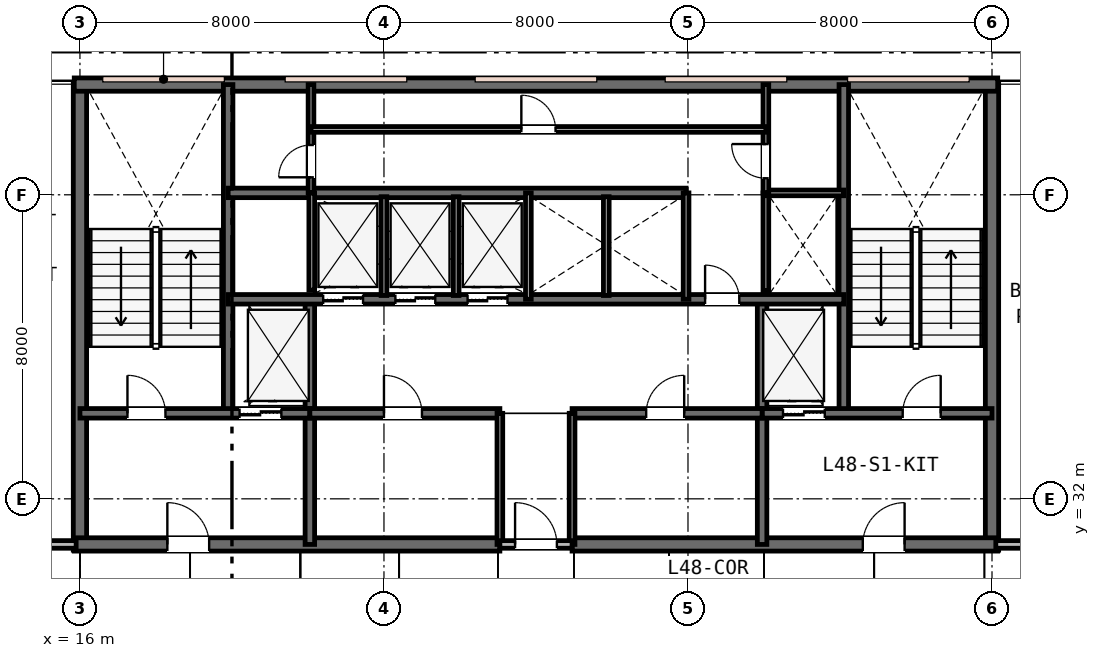
"""IFC4 building model, lengths in metres.
Left out: names, types, materials, properties, quantities, classifications, styles, units other than length and angle.
Written with IfcOpenShell. Run it as: python <this file> out.ifc"""

import sys

from ifc_helpers import new_model, si_unit, direction, frame, frame_2d, origin, place, context, subcontext, project, spatial, rectangle, extrude, element, fill, save


model = new_model("IFC4")
c1 = context("Model", 3, precision=1e-05, world=origin(), true_north=direction((0.0, 1.0)))
c2 = subcontext(c1, "Body", "Model", "MODEL_VIEW")
j1 = project(units=[si_unit("LENGTHUNIT", "METRE"), si_unit("PLANEANGLEUNIT", "RADIAN")], contexts=[c1])
p1 = place(None, origin())
s1 = spatial("IfcSite", under=j1, at=p1, CompositionType="ELEMENT")
p2 = place(p1, origin())
s2 = spatial("IfcBuilding", under=s1, at=p2, CompositionType="ELEMENT")
p3 = place(p2, frame((0.0, 0.0, 186.6)))
s3 = spatial("IfcBuildingStorey", under=s2, at=p3, CompositionType="ELEMENT", Elevation=186.6)
for number, where, z_axis, x_axis in (
    (1, (16.0, 30.65, 0.0), (0.0, 0.0, 1.0), (0.0, 1.0, 0.0)),
    (2, (40.0, 30.65, 0.0), (0.0, 0.0, 1.0), (0.0, 1.0, 0.0)),
):
    element("IfcWall", number, at=place(p3, frame(where, z_axis=z_axis, x_axis=x_axis)), inside=s3, PredefinedType="SHEAR", context=c2, shape_type="SweptSolid", body=[
        extrude(rectangle(XDim=12.3, YDim=0.35, at=frame_2d((6.15, 0.0))), origin(), (0.0, 0.0, 1.0), 3.6),
    ])
p4 = place(p3, frame((15.85, 42.9, 0.0), z_axis=(0.0, 0.0, 1.0), x_axis=(1.0, 0.0, 0.0)))
e3 = element("IfcWall", 3, at=p4, inside=s3, PredefinedType="SHEAR", context=c2, shape_type="SweptSolid", body=[
    extrude(rectangle(XDim=24.3, YDim=0.35, at=frame_2d((12.15, 0.0))), origin(), (0.0, 0.0, 1.0), 3.6),
])
p5 = place(p3, frame((15.85, 30.8, 0.0), z_axis=(0.0, 0.0, 1.0), x_axis=(1.0, 0.0, 0.0)))
e4 = element("IfcWall", 4, at=p5, inside=s3, PredefinedType="SHEAR", context=c2, shape_type="SweptSolid", body=[
    extrude(rectangle(XDim=11.2, YDim=0.35, at=frame_2d((5.6, 0.0))), origin(), (0.0, 0.0, 1.0), 3.6),
])
p6 = place(p5, frame((2.45, 0.0, 0.0)))
e5 = element("IfcOpeningElement", 5, at=p6, cuts=e4, PredefinedType="OPENING", context=c2, shape_type="SweptSolid", body=[
    extrude(rectangle(XDim=1.1, YDim=2.15, at=frame_2d((0.55, 1.075))), frame((0.0, 0.185, 0.0), z_axis=(0.0, -1.0, 0.0), x_axis=(1.0, 0.0, 0.0)), (0.0, 0.0, 1.0), 0.37),
])
p7 = place(p3, frame((28.95, 30.8, 0.0), z_axis=(0.0, 0.0, 1.0), x_axis=(1.0, 0.0, 0.0)))
e6 = element("IfcWall", 6, at=p7, inside=s3, PredefinedType="SHEAR", context=c2, shape_type="SweptSolid", body=[
    extrude(rectangle(XDim=11.2, YDim=0.35, at=frame_2d((5.6, 0.0))), origin(), (0.0, 0.0, 1.0), 3.6),
])
p8 = place(p7, frame((7.65, 0.0, 0.0)))
e7 = element("IfcOpeningElement", 7, at=p8, cuts=e6, PredefinedType="OPENING", context=c2, shape_type="SweptSolid", body=[
    extrude(rectangle(XDim=1.1, YDim=2.15, at=frame_2d((0.55, 1.075))), frame((0.0, 0.185, 0.0), z_axis=(0.0, -1.0, 0.0), x_axis=(1.0, 0.0, 0.0)), (0.0, 0.0, 1.0), 0.37),
])
for number, where, z_axis, x_axis in (
    (8, (19.9, 34.25, 0.0), (0.0, 0.0, 1.0), (0.0, 1.0, 0.0)),
    (9, (36.1, 34.25, 0.0), (0.0, 0.0, 1.0), (0.0, 1.0, 0.0)),
):
    element("IfcWall", number, at=place(p3, frame(where, z_axis=z_axis, x_axis=x_axis)), inside=s3, PredefinedType="SHEAR", context=c2, shape_type="SweptSolid", body=[
        extrude(rectangle(XDim=8.65, YDim=0.25, at=frame_2d((4.325, 0.0))), origin(), (0.0, 0.0, 1.0), 3.6),
    ])
for number, where, z_axis, x_axis in (
    (10, (22.05, 30.8, 0.0), (0.0, 0.0, 1.0), (0.0, 1.0, 0.0)),
    (11, (33.95, 30.8, 0.0), (0.0, 0.0, 1.0), (0.0, 1.0, 0.0)),
):
    element("IfcWall", number, at=place(p3, frame(where, z_axis=z_axis, x_axis=x_axis)), inside=s3, PredefinedType="SHEAR", context=c2, shape_type="SweptSolid", body=[
        extrude(rectangle(XDim=6.45, YDim=0.25, at=frame_2d((3.225, 0.0))), origin(), (0.0, 0.0, 1.0), 3.6),
    ])
p9 = place(p3, frame((16.0, 34.25, 0.0), z_axis=(0.0, 0.0, 1.0), x_axis=(1.0, 0.0, 0.0)))
e12 = element("IfcWall", 12, at=p9, inside=s3, PredefinedType="SHEAR", context=c2, shape_type="SweptSolid", body=[
    extrude(rectangle(XDim=6.05, YDim=0.25, at=frame_2d((3.025, 0.0))), origin(), (0.0, 0.0, 1.0), 3.6),
])
p10 = place(p9, frame((1.25, 0.0, 0.0)))
e13 = element("IfcOpeningElement", 13, at=p10, cuts=e12, PredefinedType="OPENING", context=c2, shape_type="SweptSolid", body=[
    extrude(rectangle(XDim=1.0, YDim=2.15, at=frame_2d((0.5, 1.075))), frame((0.0, 0.135, 0.0), z_axis=(0.0, -1.0, 0.0), x_axis=(1.0, 0.0, 0.0)), (0.0, 0.0, 1.0), 0.27),
])
p11 = place(p9, frame((4.2, 0.0, 0.0)))
e14 = element("IfcOpeningElement", 14, at=p11, cuts=e12, PredefinedType="OPENING", context=c2, shape_type="SweptSolid", body=[
    extrude(rectangle(XDim=1.1, YDim=2.15, at=frame_2d((0.55, 1.075))), frame((0.0, 0.135, 0.0), z_axis=(0.0, -1.0, 0.0), x_axis=(1.0, 0.0, 0.0)), (0.0, 0.0, 1.0), 0.27),
])
p12 = place(p3, frame((33.95, 34.25, 0.0), z_axis=(0.0, 0.0, 1.0), x_axis=(1.0, 0.0, 0.0)))
e15 = element("IfcWall", 15, at=p12, inside=s3, PredefinedType="SHEAR", context=c2, shape_type="SweptSolid", body=[
    extrude(rectangle(XDim=6.05, YDim=0.25, at=frame_2d((3.025, 0.0))), origin(), (0.0, 0.0, 1.0), 3.6),
])
p13 = place(p12, frame((3.7, 0.0, 0.0)))
e16 = element("IfcOpeningElement", 16, at=p13, cuts=e15, PredefinedType="OPENING", context=c2, shape_type="SweptSolid", body=[
    extrude(rectangle(XDim=1.0, YDim=2.15, at=frame_2d((0.5, 1.075))), frame((0.0, 0.135, 0.0), z_axis=(0.0, -1.0, 0.0), x_axis=(1.0, 0.0, 0.0)), (0.0, 0.0, 1.0), 0.27),
])
p14 = place(p12, frame((0.55, 0.0, 0.0)))
e17 = element("IfcOpeningElement", 17, at=p14, cuts=e15, PredefinedType="OPENING", context=c2, shape_type="SweptSolid", body=[
    extrude(rectangle(XDim=1.1, YDim=2.15, at=frame_2d((0.55, 1.075))), frame((0.0, 0.135, 0.0), z_axis=(0.0, -1.0, 0.0), x_axis=(1.0, 0.0, 0.0)), (0.0, 0.0, 1.0), 0.27),
])
p15 = place(p3, frame((22.05, 34.25, 0.0), z_axis=(0.0, 0.0, 1.0), x_axis=(1.0, 0.0, 0.0)))
e18 = element("IfcWall", 18, at=p15, inside=s3, PredefinedType="SHEAR", context=c2, shape_type="SweptSolid", body=[
    extrude(rectangle(XDim=5.0, YDim=0.25, at=frame_2d((2.5, 0.0))), origin(), (0.0, 0.0, 1.0), 3.6),
])
p16 = place(p15, frame((1.95, 0.0, 0.0)))
e19 = element("IfcOpeningElement", 19, at=p16, cuts=e18, PredefinedType="OPENING", context=c2, shape_type="SweptSolid", body=[
    extrude(rectangle(XDim=1.0, YDim=2.15, at=frame_2d((0.5, 1.075))), frame((0.0, 0.135, 0.0), z_axis=(0.0, -1.0, 0.0), x_axis=(1.0, 0.0, 0.0)), (0.0, 0.0, 1.0), 0.27),
])
p17 = place(p3, frame((28.95, 34.25, 0.0), z_axis=(0.0, 0.0, 1.0), x_axis=(1.0, 0.0, 0.0)))
e20 = element("IfcWall", 20, at=p17, inside=s3, PredefinedType="SHEAR", context=c2, shape_type="SweptSolid", body=[
    extrude(rectangle(XDim=5.0, YDim=0.25, at=frame_2d((2.5, 0.0))), origin(), (0.0, 0.0, 1.0), 3.6),
])
p18 = place(p17, frame((1.95, 0.0, 0.0)))
e21 = element("IfcOpeningElement", 21, at=p18, cuts=e20, PredefinedType="OPENING", context=c2, shape_type="SweptSolid", body=[
    extrude(rectangle(XDim=1.0, YDim=2.15, at=frame_2d((0.5, 1.075))), frame((0.0, 0.135, 0.0), z_axis=(0.0, -1.0, 0.0), x_axis=(1.0, 0.0, 0.0)), (0.0, 0.0, 1.0), 0.27),
])
p19 = place(p3, frame((19.9, 37.25, 0.0), z_axis=(0.0, 0.0, 1.0), x_axis=(1.0, 0.0, 0.0)))
e22 = element("IfcWall", 22, at=p19, inside=s3, PredefinedType="SHEAR", context=c2, shape_type="SweptSolid", body=[
    extrude(rectangle(XDim=16.2, YDim=0.25, at=frame_2d((8.1, 0.0))), origin(), (0.0, 0.0, 1.0), 3.6),
])
p20 = place(p19, frame((12.55, 0.0, 0.0)))
e23 = element("IfcOpeningElement", 23, at=p20, cuts=e22, PredefinedType="OPENING", context=c2, shape_type="SweptSolid", body=[
    extrude(rectangle(XDim=0.9, YDim=2.15, at=frame_2d((0.45, 1.075))), frame((0.0, 0.135, 0.0), z_axis=(0.0, -1.0, 0.0), x_axis=(1.0, 0.0, 0.0)), (0.0, 0.0, 1.0), 0.27),
])
p21 = place(p19, frame((2.5, 0.0, 0.0)))
e24 = element("IfcOpeningElement", 24, at=p21, cuts=e22, PredefinedType="OPENING", context=c2, shape_type="SweptSolid", body=[
    extrude(rectangle(XDim=1.05, YDim=2.15, at=frame_2d((0.525, 1.075))), frame((0.0, 0.135, 0.0), z_axis=(0.0, -1.0, 0.0), x_axis=(1.0, 0.0, 0.0)), (0.0, 0.0, 1.0), 0.27),
])
p22 = place(p19, frame((4.4, 0.0, 0.0)))
e25 = element("IfcOpeningElement", 25, at=p22, cuts=e22, PredefinedType="OPENING", context=c2, shape_type="SweptSolid", body=[
    extrude(rectangle(XDim=1.05, YDim=2.15, at=frame_2d((0.525, 1.075))), frame((0.0, 0.135, 0.0), z_axis=(0.0, -1.0, 0.0), x_axis=(1.0, 0.0, 0.0)), (0.0, 0.0, 1.0), 0.27),
])
p23 = place(p19, frame((6.3, 0.0, 0.0)))
e26 = element("IfcOpeningElement", 26, at=p23, cuts=e22, PredefinedType="OPENING", context=c2, shape_type="SweptSolid", body=[
    extrude(rectangle(XDim=1.05, YDim=2.15, at=frame_2d((0.525, 1.075))), frame((0.0, 0.135, 0.0), z_axis=(0.0, -1.0, 0.0), x_axis=(1.0, 0.0, 0.0)), (0.0, 0.0, 1.0), 0.27),
])
p24 = place(p3, frame((19.9, 40.05, 0.0), z_axis=(0.0, 0.0, 1.0), x_axis=(1.0, 0.0, 0.0)))
e27 = element("IfcWall", 27, at=p24, inside=s3, PredefinedType="SHEAR", context=c2, shape_type="SweptSolid", body=[
    extrude(rectangle(XDim=12.05, YDim=0.25, at=frame_2d((6.025, 0.0))), origin(), (0.0, 0.0, 1.0), 3.6),
])
for number, where, z_axis, x_axis in (
    (28, (27.05, 30.8, 0.0), (0.0, 0.0, 1.0), (0.0, 1.0, 0.0)),
    (29, (28.95, 30.8, 0.0), (0.0, 0.0, 1.0), (0.0, 1.0, 0.0)),
):
    element("IfcWall", number, at=place(p3, frame(where, z_axis=z_axis, x_axis=x_axis)), inside=s3, PredefinedType="PLUMBINGWALL", context=c2, shape_type="SweptSolid", body=[
        extrude(rectangle(XDim=3.45, YDim=0.15, at=frame_2d((1.725, 0.0))), origin(), (0.0, 0.0, 1.0), 3.07),
    ])
p25 = place(p3, frame((27.05, 30.8, 0.0), z_axis=(0.0, 0.0, 1.0), x_axis=(1.0, 0.0, 0.0)))
e30 = element("IfcWall", 30, at=p25, inside=s3, PredefinedType="PARTITIONING", context=c2, shape_type="SweptSolid", body=[
    extrude(rectangle(XDim=1.9, YDim=0.2, at=frame_2d((0.95, 0.0))), origin(), (0.0, 0.0, 1.0), 3.07),
])
p26 = place(p25, frame((0.4, 0.0, 0.0)))
e31 = element("IfcOpeningElement", 31, at=p26, cuts=e30, PredefinedType="OPENING", context=c2, shape_type="SweptSolid", body=[
    extrude(rectangle(XDim=1.1, YDim=2.15, at=frame_2d((0.55, 1.075))), frame((0.0, 0.11, 0.0), z_axis=(0.0, -1.0, 0.0), x_axis=(1.0, 0.0, 0.0)), (0.0, 0.0, 1.0), 0.22),
])
p27 = place(p3, frame((22.1, 37.49, 0.0), z_axis=(0.0, 0.0, 1.0), x_axis=(0.0, 1.0, 0.0)))
e32 = element("IfcWall", 32, at=p27, inside=s3, PredefinedType="PLUMBINGWALL", context=c2, shape_type="SweptSolid", body=[
    extrude(rectangle(XDim=2.56, YDim=0.15, at=frame_2d((1.28, 0.0))), origin(), (0.0, 0.0, 1.0), 3.33),
])
p28 = place(p3, frame((27.8, 37.25, 0.0), z_axis=(0.0, 0.0, 1.0), x_axis=(0.0, 1.0, 0.0)))
e33 = element("IfcWall", 33, at=p28, inside=s3, PredefinedType="PLUMBINGWALL", context=c2, shape_type="SweptSolid", body=[
    extrude(rectangle(XDim=2.8, YDim=0.15, at=frame_2d((1.4, 0.0))), origin(), (0.0, 0.0, 1.0), 3.33),
])
for number, where, z_axis, x_axis in (
    (34, (24.0, 37.35, 0.0), (0.0, 0.0, 1.0), (0.0, 1.0, 0.0)),
    (35, (25.9, 37.35, 0.0), (0.0, 0.0, 1.0), (0.0, 1.0, 0.0)),
):
    element("IfcWall", number, at=place(p3, frame(where, z_axis=z_axis, x_axis=x_axis)), inside=s3, PredefinedType="PLUMBINGWALL", context=c2, shape_type="SweptSolid", body=[
        extrude(rectangle(XDim=2.6, YDim=0.15, at=frame_2d((1.3, 0.0))), origin(), (0.0, 0.0, 1.0), 3.33),
    ])
p29 = place(p3, frame((31.95, 37.25, 0.0), z_axis=(0.0, 0.0, 1.0), x_axis=(0.0, 1.0, 0.0)))
e36 = element("IfcWall", 36, at=p29, inside=s3, PredefinedType="PLUMBINGWALL", context=c2, shape_type="SweptSolid", body=[
    extrude(rectangle(XDim=2.8, YDim=0.15, at=frame_2d((1.4, 0.0))), origin(), (0.0, 0.0, 1.0), 3.33),
])
p30 = place(p3, frame((29.85, 37.35, 0.0), z_axis=(0.0, 0.0, 1.0), x_axis=(0.0, 1.0, 0.0)))
e37 = element("IfcWall", 37, at=p30, inside=s3, PredefinedType="PLUMBINGWALL", context=c2, shape_type="SweptSolid", body=[
    extrude(rectangle(XDim=2.6, YDim=0.15, at=frame_2d((1.3, 0.0))), origin(), (0.0, 0.0, 1.0), 3.33),
])
p31 = place(p3, frame((34.05, 37.473, 0.0), z_axis=(0.0, 0.0, 1.0), x_axis=(0.0, 1.0, 0.0)))
e38 = element("IfcWall", 38, at=p31, inside=s3, PredefinedType="PLUMBINGWALL", context=c2, shape_type="SweptSolid", body=[
    extrude(rectangle(XDim=2.577, YDim=0.15, at=frame_2d((1.288, 0.0))), origin(), (0.0, 0.0, 1.0), 3.33),
])
p32 = place(p3, frame((34.05, 40.05, 0.0), z_axis=(0.0, 0.0, 1.0), x_axis=(1.0, 0.0, 0.0)))
e39 = element("IfcWall", 39, at=p32, inside=s3, PredefinedType="PARTITIONING", context=c2, shape_type="SweptSolid", body=[
    extrude(rectangle(XDim=2.05, YDim=0.15, at=frame_2d((1.025, 0.0))), origin(), (0.0, 0.0, 1.0), 3.33),
])
p33 = place(p3, frame((34.05, 40.05, 0.0), z_axis=(0.0, 0.0, 1.0), x_axis=(0.0, 1.0, 0.0)))
e40 = element("IfcWall", 40, at=p33, inside=s3, PredefinedType="PARTITIONING", context=c2, shape_type="SweptSolid", body=[
    extrude(rectangle(XDim=2.85, YDim=0.15, at=frame_2d((1.425, 0.0))), origin(), (0.0, 0.0, 1.0), 3.33),
])
p34 = place(p33, frame((0.385, 0.0, 0.0)))
e41 = element("IfcOpeningElement", 41, at=p34, cuts=e40, PredefinedType="OPENING", context=c2, shape_type="SweptSolid", body=[
    extrude(rectangle(XDim=0.9, YDim=2.15, at=frame_2d((0.45, 1.075))), frame((0.0, 0.085, 0.0), z_axis=(0.0, -1.0, 0.0), x_axis=(1.0, 0.0, 0.0)), (0.0, 0.0, 1.0), 0.17),
])
p35 = place(p3, frame((22.08, 40.05, 0.0), z_axis=(0.0, 0.0, 1.0), x_axis=(0.0, 1.0, 0.0)))
e42 = element("IfcWall", 42, at=p35, inside=s3, PredefinedType="PARTITIONING", context=c2, shape_type="SweptSolid", body=[
    extrude(rectangle(XDim=2.85, YDim=0.15, at=frame_2d((1.425, 0.0))), origin(), (0.0, 0.0, 1.0), 3.33),
])
p36 = place(p35, frame((0.41, 0.0, 0.0)))
e43 = element("IfcOpeningElement", 43, at=p36, cuts=e42, PredefinedType="OPENING", context=c2, shape_type="SweptSolid", body=[
    extrude(rectangle(XDim=0.85, YDim=2.15, at=frame_2d((0.425, 1.075))), frame((0.0, 0.085, 0.0), z_axis=(0.0, -1.0, 0.0), x_axis=(1.0, 0.0, 0.0)), (0.0, 0.0, 1.0), 0.17),
])
p37 = place(p3, frame((22.08, 41.72, 0.0), z_axis=(0.0, 0.0, 1.0), x_axis=(1.0, 0.0, 0.0)))
e44 = element("IfcWall", 44, at=p37, inside=s3, PredefinedType="PARTITIONING", context=c2, shape_type="SweptSolid", body=[
    extrude(rectangle(XDim=11.97, YDim=0.15, at=frame_2d((5.985, 0.0))), origin(), (0.0, 0.0, 1.0), 3.33),
])
p38 = place(p37, frame((5.535, 0.0, 0.0)))
e45 = element("IfcOpeningElement", 45, at=p38, cuts=e44, PredefinedType="OPENING", context=c2, shape_type="SweptSolid", body=[
    extrude(rectangle(XDim=0.9, YDim=2.15, at=frame_2d((0.45, 1.075))), frame((0.0, 0.085, 0.0), z_axis=(0.0, -1.0, 0.0), x_axis=(1.0, 0.0, 0.0)), (0.0, 0.0, 1.0), 0.17),
])
p39 = place(p3, frame((9.6, 30.8, 0.0), z_axis=(0.0, 0.0, 1.0), x_axis=(1.0, 0.0, 0.0)))
e46 = element("IfcWall", 46, at=p39, inside=s3, PredefinedType="PARTITIONING", context=c2, shape_type="SweptSolid", body=[
    extrude(rectangle(XDim=6.3, YDim=0.2, at=frame_2d((3.15, 0.0))), origin(), (0.0, 0.0, 1.0), 2.92),
])
p40 = place(p39, frame((0.95, 0.0, 0.0)))
e47 = element("IfcOpeningElement", 47, at=p40, cuts=e46, PredefinedType="OPENING", context=c2, shape_type="SweptSolid", body=[
    extrude(rectangle(XDim=0.95, YDim=2.15, at=frame_2d((0.475, 1.075))), frame((0.0, 0.11, 0.0), z_axis=(0.0, -1.0, 0.0), x_axis=(1.0, 0.0, 0.0)), (0.0, 0.0, 1.0), 0.22),
])
p41 = place(p39, frame((4.1, 0.0, 0.0)))
e48 = element("IfcOpeningElement", 48, at=p41, cuts=e46, PredefinedType="OPENING", context=c2, shape_type="SweptSolid", body=[
    extrude(rectangle(XDim=0.95, YDim=2.15, at=frame_2d((0.475, 1.075))), frame((0.0, 0.11, 0.0), z_axis=(0.0, -1.0, 0.0), x_axis=(1.0, 0.0, 0.0)), (0.0, 0.0, 1.0), 0.22),
])
p42 = place(p3, frame((40.1, 30.8, 0.0), z_axis=(0.0, 0.0, 1.0), x_axis=(1.0, 0.0, 0.0)))
e49 = element("IfcWall", 49, at=p42, inside=s3, PredefinedType="PARTITIONING", context=c2, shape_type="SweptSolid", body=[
    extrude(rectangle(XDim=4.1, YDim=0.2, at=frame_2d((2.05, 0.0))), origin(), (0.0, 0.0, 1.0), 2.92),
])
p43 = place(p42, frame((1.575, 0.0, 0.0)))
e50 = element("IfcOpeningElement", 50, at=p43, cuts=e49, PredefinedType="OPENING", context=c2, shape_type="SweptSolid", body=[
    extrude(rectangle(XDim=0.95, YDim=2.15, at=frame_2d((0.475, 1.075))), frame((0.0, 0.11, 0.0), z_axis=(0.0, -1.0, 0.0), x_axis=(1.0, 0.0, 0.0)), (0.0, 0.0, 1.0), 0.22),
])
p44 = place(p26, origin())
e51 = element("IfcDoor", 51, at=p44, inside=s3, OperationType="SINGLE_SWING_LEFT", PredefinedType="DOOR", context=c2, shape_type="SweptSolid", body=[
    extrude(rectangle(XDim=1.1, YDim=2.15, at=frame_2d((0.55, 1.075))), frame((0.0, 0.025, 0.0), z_axis=(0.0, -1.0, 0.0), x_axis=(1.0, 0.0, 0.0)), (0.0, 0.0, 1.0), 0.05),
])
fill(e31, e51)
p45 = place(p10, origin())
e52 = element("IfcDoor", 52, at=p45, inside=s3, OperationType="SINGLE_SWING_LEFT", PredefinedType="DOOR", context=c2, shape_type="SweptSolid", body=[
    extrude(rectangle(XDim=1.0, YDim=2.15, at=frame_2d((0.5, 1.075))), frame((0.0, 0.025, 0.0), z_axis=(0.0, -1.0, 0.0), x_axis=(1.0, 0.0, 0.0)), (0.0, 0.0, 1.0), 0.05),
])
fill(e13, e52)
p46 = place(p13, origin())
e53 = element("IfcDoor", 53, at=p46, inside=s3, OperationType="SINGLE_SWING_RIGHT", PredefinedType="DOOR", context=c2, shape_type="SweptSolid", body=[
    extrude(rectangle(XDim=1.0, YDim=2.15, at=frame_2d((0.5, 1.075))), frame((0.0, 0.025, 0.0), z_axis=(0.0, -1.0, 0.0), x_axis=(1.0, 0.0, 0.0)), (0.0, 0.0, 1.0), 0.05),
])
fill(e16, e53)
p47 = place(p6, origin())
e54 = element("IfcDoor", 54, at=p47, inside=s3, OperationType="SINGLE_SWING_LEFT", PredefinedType="DOOR", context=c2, shape_type="SweptSolid", body=[
    extrude(rectangle(XDim=1.1, YDim=2.15, at=frame_2d((0.55, 1.075))), frame((0.0, 0.025, 0.0), z_axis=(0.0, -1.0, 0.0), x_axis=(1.0, 0.0, 0.0)), (0.0, 0.0, 1.0), 0.05),
])
fill(e5, e54)
p48 = place(p8, origin())
e55 = element("IfcDoor", 55, at=p48, inside=s3, OperationType="SINGLE_SWING_RIGHT", PredefinedType="DOOR", context=c2, shape_type="SweptSolid", body=[
    extrude(rectangle(XDim=1.1, YDim=2.15, at=frame_2d((0.55, 1.075))), frame((0.0, 0.025, 0.0), z_axis=(0.0, -1.0, 0.0), x_axis=(1.0, 0.0, 0.0)), (0.0, 0.0, 1.0), 0.05),
])
fill(e7, e55)
p49 = place(p16, origin())
e56 = element("IfcDoor", 56, at=p49, inside=s3, OperationType="SINGLE_SWING_LEFT", PredefinedType="DOOR", context=c2, shape_type="SweptSolid", body=[
    extrude(rectangle(XDim=1.0, YDim=2.15, at=frame_2d((0.5, 1.075))), frame((0.0, 0.025, 0.0), z_axis=(0.0, -1.0, 0.0), x_axis=(1.0, 0.0, 0.0)), (0.0, 0.0, 1.0), 0.05),
])
fill(e19, e56)
p50 = place(p18, origin())
e57 = element("IfcDoor", 57, at=p50, inside=s3, OperationType="SINGLE_SWING_RIGHT", PredefinedType="DOOR", context=c2, shape_type="SweptSolid", body=[
    extrude(rectangle(XDim=1.0, YDim=2.15, at=frame_2d((0.5, 1.075))), frame((0.0, 0.025, 0.0), z_axis=(0.0, -1.0, 0.0), x_axis=(1.0, 0.0, 0.0)), (0.0, 0.0, 1.0), 0.05),
])
fill(e21, e57)
p51 = place(p20, origin())
e58 = element("IfcDoor", 58, at=p51, inside=s3, OperationType="SINGLE_SWING_LEFT", PredefinedType="DOOR", context=c2, shape_type="SweptSolid", body=[
    extrude(rectangle(XDim=0.9, YDim=2.15, at=frame_2d((0.45, 1.075))), frame((0.0, 0.025, 0.0), z_axis=(0.0, -1.0, 0.0), x_axis=(1.0, 0.0, 0.0)), (0.0, 0.0, 1.0), 0.05),
])
fill(e23, e58)
p52 = place(p34, origin())
e59 = element("IfcDoor", 59, at=p52, inside=s3, OperationType="SINGLE_SWING_RIGHT", PredefinedType="DOOR", context=c2, shape_type="SweptSolid", body=[
    extrude(rectangle(XDim=0.9, YDim=2.15, at=frame_2d((0.45, 1.075))), frame((0.0, 0.025, 0.0), z_axis=(0.0, -1.0, 0.0), x_axis=(1.0, 0.0, 0.0)), (0.0, 0.0, 1.0), 0.05),
])
fill(e41, e59)
p53 = place(p36, origin())
e60 = element("IfcDoor", 60, at=p53, inside=s3, OperationType="SINGLE_SWING_LEFT", PredefinedType="DOOR", context=c2, shape_type="SweptSolid", body=[
    extrude(rectangle(XDim=0.85, YDim=2.15, at=frame_2d((0.425, 1.075))), frame((0.0, 0.025, 0.0), z_axis=(0.0, -1.0, 0.0), x_axis=(1.0, 0.0, 0.0)), (0.0, 0.0, 1.0), 0.05),
])
fill(e43, e60)
p54 = place(p38, origin())
e61 = element("IfcDoor", 61, at=p54, inside=s3, OperationType="SINGLE_SWING_LEFT", PredefinedType="DOOR", context=c2, shape_type="SweptSolid", body=[
    extrude(rectangle(XDim=0.9, YDim=2.15, at=frame_2d((0.45, 1.075))), frame((0.0, 0.025, 0.0), z_axis=(0.0, -1.0, 0.0), x_axis=(1.0, 0.0, 0.0)), (0.0, 0.0, 1.0), 0.05),
])
fill(e45, e61)
p55 = place(p11, origin())
e62 = element("IfcDoor", 62, at=p55, inside=s3, OperationType="DOUBLE_DOOR_SLIDING", PredefinedType="DOOR", context=c2, shape_type="SweptSolid", body=[
    extrude(rectangle(XDim=1.1, YDim=2.15, at=frame_2d((0.55, 1.075))), frame((0.0, 0.025, 0.0), z_axis=(0.0, -1.0, 0.0), x_axis=(1.0, 0.0, 0.0)), (0.0, 0.0, 1.0), 0.05),
])
fill(e14, e62)
p56 = place(p14, origin())
e63 = element("IfcDoor", 63, at=p56, inside=s3, OperationType="DOUBLE_DOOR_SLIDING", PredefinedType="DOOR", context=c2, shape_type="SweptSolid", body=[
    extrude(rectangle(XDim=1.1, YDim=2.15, at=frame_2d((0.55, 1.075))), frame((0.0, 0.025, 0.0), z_axis=(0.0, -1.0, 0.0), x_axis=(1.0, 0.0, 0.0)), (0.0, 0.0, 1.0), 0.05),
])
fill(e17, e63)
p57 = place(p21, origin())
e64 = element("IfcDoor", 64, at=p57, inside=s3, OperationType="DOUBLE_DOOR_SLIDING", PredefinedType="DOOR", context=c2, shape_type="SweptSolid", body=[
    extrude(rectangle(XDim=1.05, YDim=2.15, at=frame_2d((0.525, 1.075))), frame((0.0, 0.025, 0.0), z_axis=(0.0, -1.0, 0.0), x_axis=(1.0, 0.0, 0.0)), (0.0, 0.0, 1.0), 0.05),
])
fill(e24, e64)
p58 = place(p22, origin())
e65 = element("IfcDoor", 65, at=p58, inside=s3, OperationType="DOUBLE_DOOR_SLIDING", PredefinedType="DOOR", context=c2, shape_type="SweptSolid", body=[
    extrude(rectangle(XDim=1.05, YDim=2.15, at=frame_2d((0.525, 1.075))), frame((0.0, 0.025, 0.0), z_axis=(0.0, -1.0, 0.0), x_axis=(1.0, 0.0, 0.0)), (0.0, 0.0, 1.0), 0.05),
])
fill(e25, e65)
p59 = place(p23, origin())
e66 = element("IfcDoor", 66, at=p59, inside=s3, OperationType="DOUBLE_DOOR_SLIDING", PredefinedType="DOOR", context=c2, shape_type="SweptSolid", body=[
    extrude(rectangle(XDim=1.05, YDim=2.15, at=frame_2d((0.525, 1.075))), frame((0.0, 0.025, 0.0), z_axis=(0.0, -1.0, 0.0), x_axis=(1.0, 0.0, 0.0)), (0.0, 0.0, 1.0), 0.05),
])
fill(e26, e66)
save(model, sys.argv[1])
